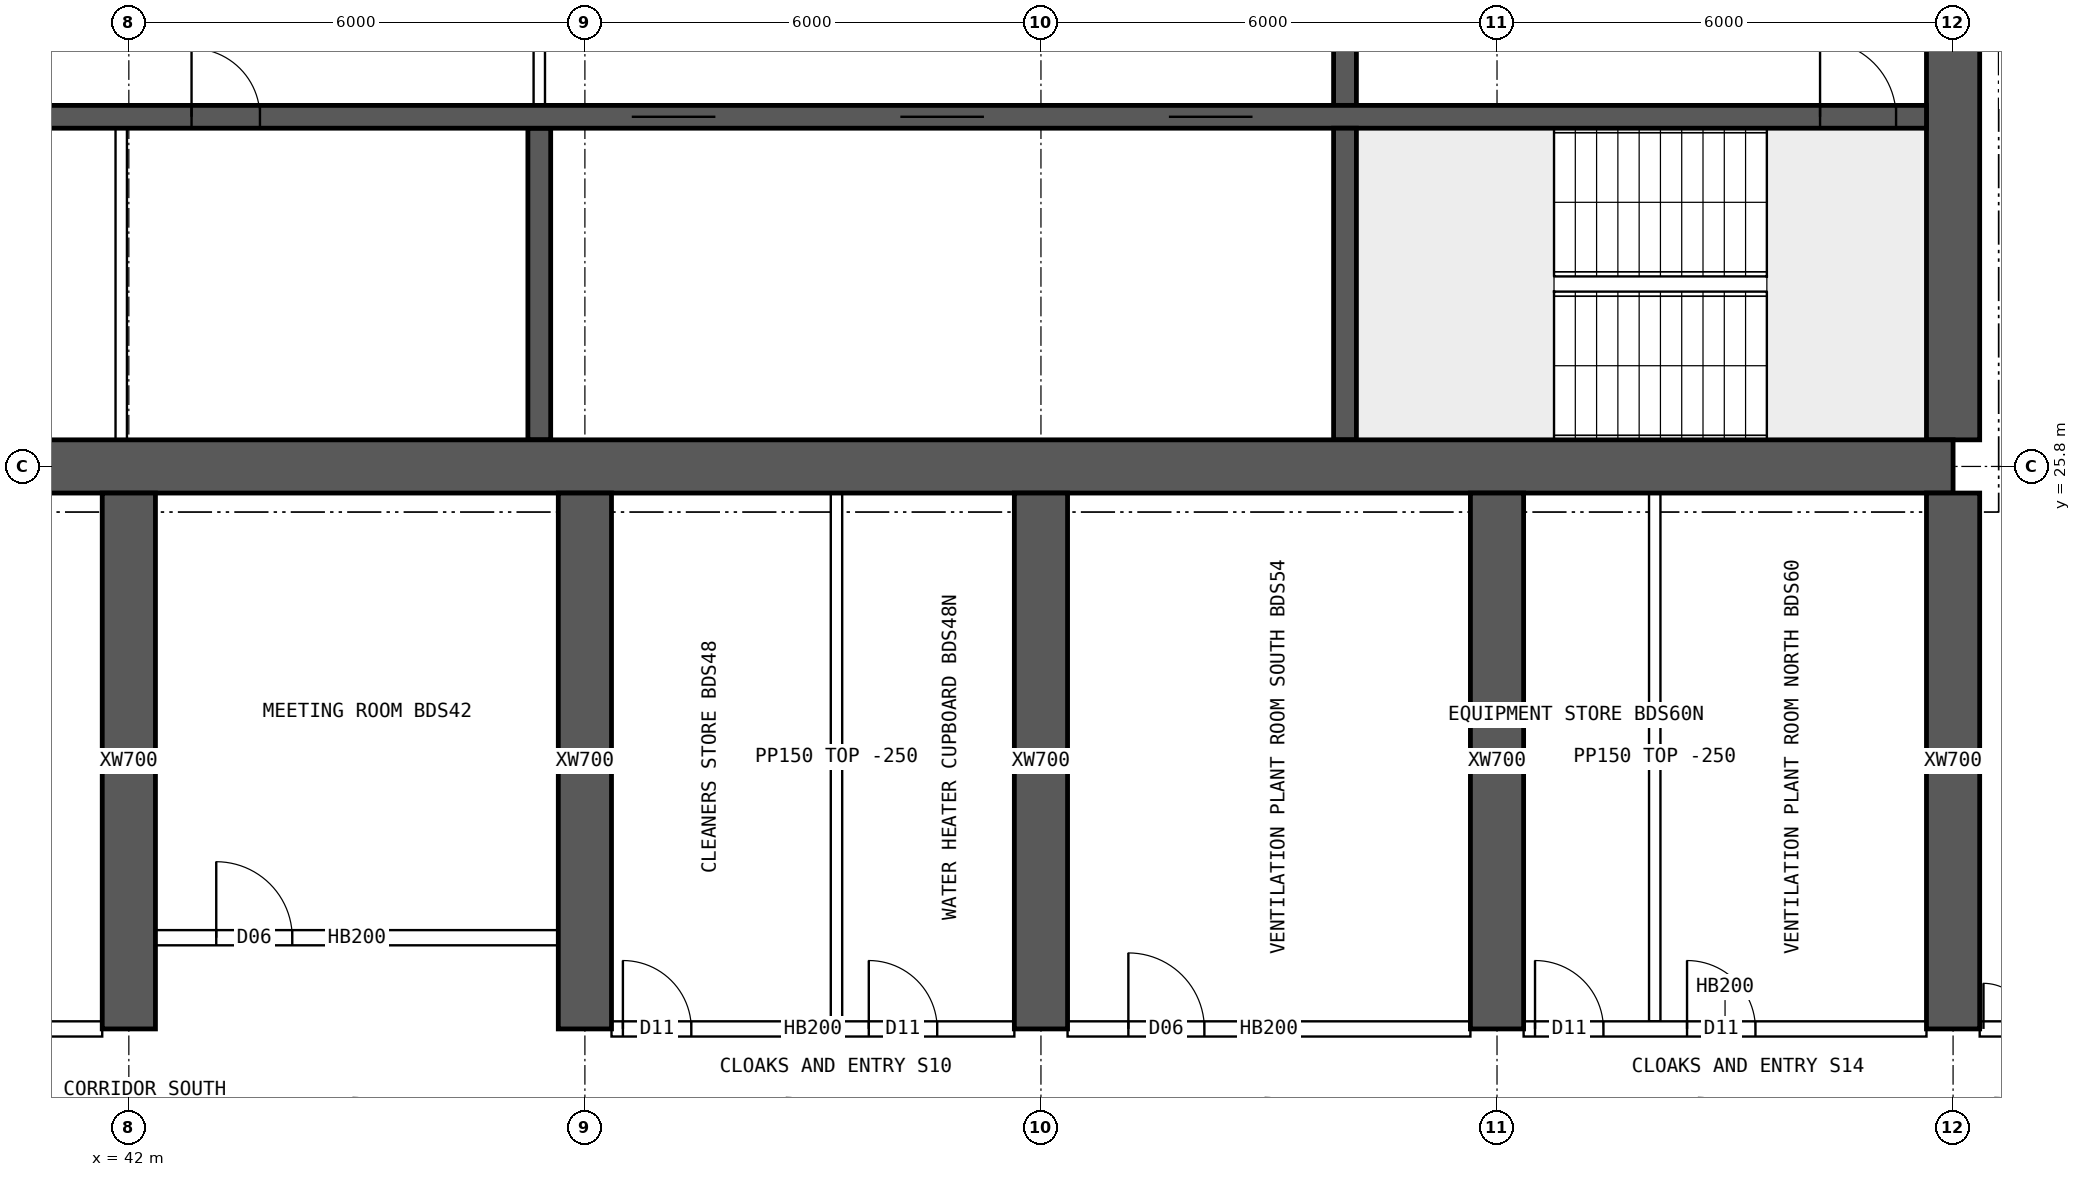
"""IFC4 building model, lengths in metres.
Left out: names, types, materials, properties, quantities, classifications, styles, units other than length and angle.
Written with IfcOpenShell. Run it as: python <this file> out.ifc"""

import sys

from ifc_helpers import new_model, si_unit, direction, frame, frame_2d, origin, place, context, subcontext, project, spatial, rectangle, extrude, element, fill, save


model = new_model("IFC4")
c1 = context("Model", 3, precision=1e-05, world=origin(), true_north=direction((0.0, 1.0)))
c2 = subcontext(c1, "Body", "Model", "MODEL_VIEW")
j1 = project(units=[si_unit("LENGTHUNIT", "METRE"), si_unit("PLANEANGLEUNIT", "RADIAN")], contexts=[c1])
p1 = place(None, origin())
s1 = spatial("IfcSite", under=j1, at=p1, CompositionType="ELEMENT")
p2 = place(p1, origin())
s2 = spatial("IfcBuilding", under=s1, at=p2, CompositionType="ELEMENT")
p3 = place(p2, frame((0.0, 0.0, 224.05)))
s3 = spatial("IfcBuildingStorey", under=s2, at=p3, CompositionType="ELEMENT", Elevation=224.05)
p4 = place(p3, frame((18.0, 25.8, 0.0), z_axis=(0.0, 0.0, 1.0), x_axis=(1.0, 0.0, 0.0)))
e1 = element("IfcWall", 1, at=p4, inside=s3, PredefinedType="SHEAR", context=c2, shape_type="SweptSolid", body=[
    extrude(rectangle(XDim=48.0, YDim=0.7, at=frame_2d((24.0, 0.0))), origin(), (0.0, 0.0, 1.0), 3.75),
])
p5 = place(p3, frame((66.0, 26.15, 0.0), z_axis=(0.0, 0.0, 1.0), x_axis=(0.0, 1.0, 0.0)))
e2 = element("IfcWall", 2, at=p5, inside=s3, PredefinedType="SHEAR", context=c2, shape_type="SweptSolid", body=[
    extrude(rectangle(XDim=11.7, YDim=0.7, at=frame_2d((5.85, 0.0))), origin(), (0.0, 0.0, 1.0), 3.75),
])
p6 = place(p5, frame((5.15, 0.0, 0.0)))
e3 = element("IfcOpeningElement", 3, at=p6, cuts=e2, PredefinedType="OPENING", context=c2, shape_type="SweptSolid", body=[
    extrude(rectangle(XDim=1.2, YDim=2.1, at=frame_2d((0.6, 1.05))), frame((0.0, 0.36, 0.0), z_axis=(0.0, -1.0, 0.0), x_axis=(1.0, 0.0, 0.0)), (0.0, 0.0, 1.0), 0.72),
])
p7 = place(p3, frame((18.35, 30.4, 0.0), z_axis=(0.0, 0.0, 1.0), x_axis=(1.0, 0.0, 0.0)))
e4 = element("IfcWall", 4, at=p7, inside=s3, PredefinedType="SHEAR", context=c2, shape_type="SweptSolid", body=[
    extrude(rectangle(XDim=47.3, YDim=0.3, at=frame_2d((23.65, 0.0))), origin(), (0.0, 0.0, 1.0), 3.75),
])
p8 = place(p7, frame((0.4, 0.0, 0.0)))
e5 = element("IfcOpeningElement", 5, at=p8, cuts=e4, PredefinedType="OPENING", context=c2, shape_type="SweptSolid", body=[
    extrude(rectangle(XDim=1.0, YDim=2.1, at=frame_2d((0.5, 1.05))), frame((0.0, 0.16, 0.0), z_axis=(0.0, -1.0, 0.0), x_axis=(1.0, 0.0, 0.0)), (0.0, 0.0, 1.0), 0.32),
])
p9 = place(p7, frame((45.9, 0.0, 0.0)))
e6 = element("IfcOpeningElement", 6, at=p9, cuts=e4, PredefinedType="OPENING", context=c2, shape_type="SweptSolid", body=[
    extrude(rectangle(XDim=1.0, YDim=2.1, at=frame_2d((0.5, 1.05))), frame((0.0, 0.16, 0.0), z_axis=(0.0, -1.0, 0.0), x_axis=(1.0, 0.0, 0.0)), (0.0, 0.0, 1.0), 0.32),
])
p10 = place(p7, frame((8.4, 0.0, 0.0)))
e7 = element("IfcOpeningElement", 7, at=p10, cuts=e4, PredefinedType="OPENING", context=c2, shape_type="SweptSolid", body=[
    extrude(rectangle(XDim=1.1, YDim=2.1, at=frame_2d((0.55, 1.05))), frame((0.0, 0.16, 0.0), z_axis=(0.0, -1.0, 0.0), x_axis=(1.0, 0.0, 0.0)), (0.0, 0.0, 1.0), 0.32),
])
p11 = place(p7, frame((11.0, 0.0, 0.0)))
e8 = element("IfcOpeningElement", 8, at=p11, cuts=e4, PredefinedType="OPENING", context=c2, shape_type="SweptSolid", body=[
    extrude(rectangle(XDim=1.1, YDim=2.1, at=frame_2d((0.55, 1.05))), frame((0.0, 0.16, 0.0), z_axis=(0.0, -1.0, 0.0), x_axis=(1.0, 0.0, 0.0)), (0.0, 0.0, 1.0), 0.32),
])
p12 = place(p7, frame((13.6, 0.0, 0.0)))
e9 = element("IfcOpeningElement", 9, at=p12, cuts=e4, PredefinedType="OPENING", context=c2, shape_type="SweptSolid", body=[
    extrude(rectangle(XDim=1.1, YDim=2.1, at=frame_2d((0.55, 1.05))), frame((0.0, 0.16, 0.0), z_axis=(0.0, -1.0, 0.0), x_axis=(1.0, 0.0, 0.0)), (0.0, 0.0, 1.0), 0.32),
])
p13 = place(p7, frame((16.2, 0.0, 0.0)))
e10 = element("IfcOpeningElement", 10, at=p13, cuts=e4, PredefinedType="OPENING", context=c2, shape_type="SweptSolid", body=[
    extrude(rectangle(XDim=1.1, YDim=2.1, at=frame_2d((0.55, 1.05))), frame((0.0, 0.16, 0.0), z_axis=(0.0, -1.0, 0.0), x_axis=(1.0, 0.0, 0.0)), (0.0, 0.0, 1.0), 0.32),
])
p14 = place(p7, frame((18.975, 0.0, 0.0)))
e11 = element("IfcOpeningElement", 11, at=p14, cuts=e4, PredefinedType="OPENING", context=c2, shape_type="SweptSolid", body=[
    extrude(rectangle(XDim=0.9, YDim=2.1, at=frame_2d((0.45, 1.05))), frame((0.0, 0.16, 0.0), z_axis=(0.0, -1.0, 0.0), x_axis=(1.0, 0.0, 0.0)), (0.0, 0.0, 1.0), 0.32),
])
p15 = place(p7, frame((24.475, 0.0, 0.0)))
e12 = element("IfcOpeningElement", 12, at=p15, cuts=e4, PredefinedType="OPENING", context=c2, shape_type="SweptSolid", body=[
    extrude(rectangle(XDim=0.9, YDim=2.1, at=frame_2d((0.45, 1.05))), frame((0.0, 0.16, 0.0), z_axis=(0.0, -1.0, 0.0), x_axis=(1.0, 0.0, 0.0)), (0.0, 0.0, 1.0), 0.32),
])
p16 = place(p7, frame((30.267, 0.0, 0.0)))
e13 = element("IfcOpeningElement", 13, at=p16, cuts=e4, PredefinedType="OPENING", context=c2, shape_type="SweptSolid", body=[
    extrude(rectangle(XDim=1.1, YDim=2.1, at=frame_2d((0.55, 1.05))), frame((0.0, 0.16, 0.0), z_axis=(0.0, -1.0, 0.0), x_axis=(1.0, 0.0, 0.0)), (0.0, 0.0, 1.0), 0.32),
])
p17 = place(p7, frame((33.8, 0.0, 0.0)))
e14 = element("IfcOpeningElement", 14, at=p17, cuts=e4, PredefinedType="OPENING", context=c2, shape_type="SweptSolid", body=[
    extrude(rectangle(XDim=1.1, YDim=2.1, at=frame_2d((0.55, 1.05))), frame((0.0, 0.16, 0.0), z_axis=(0.0, -1.0, 0.0), x_axis=(1.0, 0.0, 0.0)), (0.0, 0.0, 1.0), 0.32),
])
p18 = place(p7, frame((37.333, 0.0, 0.0)))
e15 = element("IfcOpeningElement", 15, at=p18, cuts=e4, PredefinedType="OPENING", context=c2, shape_type="SweptSolid", body=[
    extrude(rectangle(XDim=1.1, YDim=2.1, at=frame_2d((0.55, 1.05))), frame((0.0, 0.16, 0.0), z_axis=(0.0, -1.0, 0.0), x_axis=(1.0, 0.0, 0.0)), (0.0, 0.0, 1.0), 0.32),
])
p19 = place(p3, frame((58.0, 26.15, 0.0), z_axis=(0.0, 0.0, 1.0), x_axis=(0.0, 1.0, 0.0)))
e16 = element("IfcWall", 16, at=p19, inside=s3, PredefinedType="SHEAR", context=c2, shape_type="SweptSolid", body=[
    extrude(rectangle(XDim=4.1, YDim=0.3, at=frame_2d((2.05, 0.0))), origin(), (0.0, 0.0, 1.0), 3.75),
])
p20 = place(p3, frame((58.0, 30.55, 0.0), z_axis=(0.0, 0.0, 1.0), x_axis=(0.0, 1.0, 0.0)))
e17 = element("IfcWall", 17, at=p20, inside=s3, PredefinedType="SHEAR", context=c2, shape_type="SweptSolid", body=[
    extrude(rectangle(XDim=3.9, YDim=0.3, at=frame_2d((1.95, 0.0))), origin(), (0.0, 0.0, 1.0), 3.75),
])
p21 = place(p20, frame((1.4, 0.0, 0.0)))
e18 = element("IfcOpeningElement", 18, at=p21, cuts=e17, PredefinedType="OPENING", context=c2, shape_type="SweptSolid", body=[
    extrude(rectangle(XDim=1.2, YDim=2.1, at=frame_2d((0.6, 1.05))), frame((0.0, 0.16, 0.0), z_axis=(0.0, -1.0, 0.0), x_axis=(1.0, 0.0, 0.0)), (0.0, 0.0, 1.0), 0.32),
])
p22 = place(p3, frame((47.4, 26.15, 0.0), z_axis=(0.0, 0.0, 1.0), x_axis=(0.0, 1.0, 0.0)))
e19 = element("IfcWall", 19, at=p22, inside=s3, PredefinedType="SHEAR", context=c2, shape_type="SweptSolid", body=[
    extrude(rectangle(XDim=4.1, YDim=0.3, at=frame_2d((2.05, 0.0))), origin(), (0.0, 0.0, 1.0), 3.75),
])
for number, where, z_axis, x_axis in (
    (20, (42.0, 18.4, 0.0), (0.0, 0.0, 1.0), (0.0, 1.0, 0.0)),
    (21, (48.0, 18.4, 0.0), (0.0, 0.0, 1.0), (0.0, 1.0, 0.0)),
    (22, (54.0, 18.4, 0.0), (0.0, 0.0, 1.0), (0.0, 1.0, 0.0)),
    (23, (60.0, 18.4, 0.0), (0.0, 0.0, 1.0), (0.0, 1.0, 0.0)),
    (24, (66.0, 18.4, 0.0), (0.0, 0.0, 1.0), (0.0, 1.0, 0.0)),
):
    element("IfcWall", number, at=place(p3, frame(where, z_axis=z_axis, x_axis=x_axis)), inside=s3, PredefinedType="SHEAR", context=c2, shape_type="SweptSolid", body=[
        extrude(rectangle(XDim=7.05, YDim=0.7, at=frame_2d((3.525, 0.0))), origin(), (0.0, 0.0, 1.0), 3.75),
    ])
p23 = place(p3, frame((47.4, 30.55, 0.0), z_axis=(0.0, 0.0, 1.0), x_axis=(0.0, 1.0, 0.0)))
e25 = element("IfcWall", 25, at=p23, inside=s3, PredefinedType="SOLIDWALL", context=c2, shape_type="SweptSolid", body=[
    extrude(rectangle(XDim=3.9, YDim=0.15, at=frame_2d((1.95, 0.0))), origin(), (0.0, 0.0, 1.0), 3.5),
])
p24 = place(p23, frame((1.15, 0.0, 0.0)))
e26 = element("IfcOpeningElement", 26, at=p24, cuts=e25, PredefinedType="OPENING", context=c2, shape_type="SweptSolid", body=[
    extrude(rectangle(XDim=1.6, YDim=2.1, at=frame_2d((0.8, 1.05))), frame((0.0, 0.085, 0.0), z_axis=(0.0, -1.0, 0.0), x_axis=(1.0, 0.0, 0.0)), (0.0, 0.0, 1.0), 0.17),
])
p25 = place(p3, frame((41.9, 26.15, 0.0), z_axis=(0.0, 0.0, 1.0), x_axis=(0.0, 1.0, 0.0)))
e27 = element("IfcWall", 27, at=p25, inside=s3, PredefinedType="SOLIDWALL", context=c2, shape_type="SweptSolid", body=[
    extrude(rectangle(XDim=4.1, YDim=0.15, at=frame_2d((2.05, 0.0))), origin(), (0.0, 0.0, 1.0), 3.5),
])
p26 = place(p3, frame((36.35, 18.4, 0.0), z_axis=(0.0, 0.0, 1.0), x_axis=(1.0, 0.0, 0.0)))
e28 = element("IfcWall", 28, at=p26, inside=s3, PredefinedType="SOLIDWALL", context=c2, shape_type="SweptSolid", body=[
    extrude(rectangle(XDim=5.3, YDim=0.2, at=frame_2d((2.65, 0.0))), origin(), (0.0, 0.0, 1.0), 3.5),
])
p27 = place(p26, frame((0.525, 0.0, 0.0)))
e29 = element("IfcOpeningElement", 29, at=p27, cuts=e28, PredefinedType="OPENING", context=c2, shape_type="SweptSolid", body=[
    extrude(rectangle(XDim=1.0, YDim=2.1, at=frame_2d((0.5, 1.05))), frame((0.0, 0.11, 0.0), z_axis=(0.0, -1.0, 0.0), x_axis=(1.0, 0.0, 0.0)), (0.0, 0.0, 1.0), 0.22),
])
p28 = place(p3, frame((48.35, 18.4, 0.0), z_axis=(0.0, 0.0, 1.0), x_axis=(1.0, 0.0, 0.0)))
e30 = element("IfcWall", 30, at=p28, inside=s3, PredefinedType="SOLIDWALL", context=c2, shape_type="SweptSolid", body=[
    extrude(rectangle(XDim=5.3, YDim=0.2, at=frame_2d((2.65, 0.0))), origin(), (0.0, 0.0, 1.0), 3.5),
])
p29 = place(p28, frame((0.15, 0.0, 0.0)))
e31 = element("IfcOpeningElement", 31, at=p29, cuts=e30, PredefinedType="OPENING", context=c2, shape_type="SweptSolid", body=[
    extrude(rectangle(XDim=0.9, YDim=2.1, at=frame_2d((0.45, 1.05))), frame((0.0, 0.11, 0.0), z_axis=(0.0, -1.0, 0.0), x_axis=(1.0, 0.0, 0.0)), (0.0, 0.0, 1.0), 0.22),
])
p30 = place(p28, frame((3.385, 0.0, 0.0)))
e32 = element("IfcOpeningElement", 32, at=p30, cuts=e30, PredefinedType="OPENING", context=c2, shape_type="SweptSolid", body=[
    extrude(rectangle(XDim=0.9, YDim=2.1, at=frame_2d((0.45, 1.05))), frame((0.0, 0.11, 0.0), z_axis=(0.0, -1.0, 0.0), x_axis=(1.0, 0.0, 0.0)), (0.0, 0.0, 1.0), 0.22),
])
p31 = place(p3, frame((54.35, 18.4, 0.0), z_axis=(0.0, 0.0, 1.0), x_axis=(1.0, 0.0, 0.0)))
e33 = element("IfcWall", 33, at=p31, inside=s3, PredefinedType="SOLIDWALL", context=c2, shape_type="SweptSolid", body=[
    extrude(rectangle(XDim=5.3, YDim=0.2, at=frame_2d((2.65, 0.0))), origin(), (0.0, 0.0, 1.0), 3.5),
])
p32 = place(p31, frame((0.8, 0.0, 0.0)))
e34 = element("IfcOpeningElement", 34, at=p32, cuts=e33, PredefinedType="OPENING", context=c2, shape_type="SweptSolid", body=[
    extrude(rectangle(XDim=1.0, YDim=2.1, at=frame_2d((0.5, 1.05))), frame((0.0, 0.11, 0.0), z_axis=(0.0, -1.0, 0.0), x_axis=(1.0, 0.0, 0.0)), (0.0, 0.0, 1.0), 0.22),
])
p33 = place(p3, frame((60.35, 18.4, 0.0), z_axis=(0.0, 0.0, 1.0), x_axis=(1.0, 0.0, 0.0)))
e35 = element("IfcWall", 35, at=p33, inside=s3, PredefinedType="SOLIDWALL", context=c2, shape_type="SweptSolid", body=[
    extrude(rectangle(XDim=5.3, YDim=0.2, at=frame_2d((2.65, 0.0))), origin(), (0.0, 0.0, 1.0), 3.5),
])
p34 = place(p33, frame((0.15, 0.0, 0.0)))
e36 = element("IfcOpeningElement", 36, at=p34, cuts=e35, PredefinedType="OPENING", context=c2, shape_type="SweptSolid", body=[
    extrude(rectangle(XDim=0.9, YDim=2.1, at=frame_2d((0.45, 1.05))), frame((0.0, 0.11, 0.0), z_axis=(0.0, -1.0, 0.0), x_axis=(1.0, 0.0, 0.0)), (0.0, 0.0, 1.0), 0.22),
])
p35 = place(p33, frame((2.15, 0.0, 0.0)))
e37 = element("IfcOpeningElement", 37, at=p35, cuts=e35, PredefinedType="OPENING", context=c2, shape_type="SweptSolid", body=[
    extrude(rectangle(XDim=0.9, YDim=2.1, at=frame_2d((0.45, 1.05))), frame((0.0, 0.11, 0.0), z_axis=(0.0, -1.0, 0.0), x_axis=(1.0, 0.0, 0.0)), (0.0, 0.0, 1.0), 0.22),
])
p36 = place(p3, frame((66.35, 18.4, 0.0), z_axis=(0.0, 0.0, 1.0), x_axis=(1.0, 0.0, 0.0)))
e38 = element("IfcWall", 38, at=p36, inside=s3, PredefinedType="SOLIDWALL", context=c2, shape_type="SweptSolid", body=[
    extrude(rectangle(XDim=2.05, YDim=0.2, at=frame_2d((1.025, 0.0))), origin(), (0.0, 0.0, 1.0), 3.5),
])
p37 = place(p36, frame((0.05, 0.0, 0.0)))
e39 = element("IfcOpeningElement", 39, at=p37, cuts=e38, PredefinedType="OPENING", context=c2, shape_type="SweptSolid", body=[
    extrude(rectangle(XDim=1.2, YDim=2.1, at=frame_2d((0.6, 1.05))), frame((0.0, 0.11, 0.0), z_axis=(0.0, -1.0, 0.0), x_axis=(1.0, 0.0, 0.0)), (0.0, 0.0, 1.0), 0.22),
])
p38 = place(p3, frame((42.35, 19.6, 0.0), z_axis=(0.0, 0.0, 1.0), x_axis=(1.0, 0.0, 0.0)))
e40 = element("IfcWall", 40, at=p38, inside=s3, PredefinedType="SOLIDWALL", context=c2, shape_type="SweptSolid", body=[
    extrude(rectangle(XDim=5.3, YDim=0.2, at=frame_2d((2.65, 0.0))), origin(), (0.0, 0.0, 1.0), 3.5),
])
p39 = place(p38, frame((0.8, 0.0, 0.0)))
e41 = element("IfcOpeningElement", 41, at=p39, cuts=e40, PredefinedType="OPENING", context=c2, shape_type="SweptSolid", body=[
    extrude(rectangle(XDim=1.0, YDim=2.1, at=frame_2d((0.5, 1.05))), frame((0.0, 0.11, 0.0), z_axis=(0.0, -1.0, 0.0), x_axis=(1.0, 0.0, 0.0)), (0.0, 0.0, 1.0), 0.22),
])
for number, where, z_axis, x_axis in (
    (42, (51.31, 18.5, 0.0), (0.0, 0.0, 1.0), (0.0, 1.0, 0.0)),
    (43, (62.075, 18.5, 0.0), (0.0, 0.0, 1.0), (0.0, 1.0, 0.0)),
):
    element("IfcWall", number, at=place(p3, frame(where, z_axis=z_axis, x_axis=x_axis)), inside=s3, PredefinedType="PARTITIONING", context=c2, shape_type="SweptSolid", body=[
        extrude(rectangle(XDim=6.95, YDim=0.15, at=frame_2d((3.475, 0.0))), origin(), (0.0, 0.0, 1.0), 3.5),
    ])
p40 = place(p9, origin())
e44 = element("IfcDoor", 44, at=p40, inside=s3, OperationType="SINGLE_SWING_LEFT", PredefinedType="DOOR", context=c2, shape_type="SweptSolid", body=[
    extrude(rectangle(XDim=1.0, YDim=2.1, at=frame_2d((0.5, 1.05))), frame((0.0, 0.025, 0.0), z_axis=(0.0, -1.0, 0.0), x_axis=(1.0, 0.0, 0.0)), (0.0, 0.0, 1.0), 0.05),
])
fill(e6, e44)
p41 = place(p15, origin())
e45 = element("IfcDoor", 45, at=p41, inside=s3, OperationType="SINGLE_SWING_LEFT", PredefinedType="DOOR", context=c2, shape_type="SweptSolid", body=[
    extrude(rectangle(XDim=0.9, YDim=2.1, at=frame_2d((0.45, 1.05))), frame((0.0, 0.025, 0.0), z_axis=(0.0, -1.0, 0.0), x_axis=(1.0, 0.0, 0.0)), (0.0, 0.0, 1.0), 0.05),
])
fill(e12, e45)
p42 = place(p16, origin())
e46 = element("IfcDoor", 46, at=p42, inside=s3, OperationType="DOUBLE_DOOR_SLIDING", PredefinedType="DOOR", context=c2, shape_type="SweptSolid", body=[
    extrude(rectangle(XDim=1.1, YDim=2.1, at=frame_2d((0.55, 1.05))), frame((0.0, 0.025, 0.0), z_axis=(0.0, -1.0, 0.0), x_axis=(1.0, 0.0, 0.0)), (0.0, 0.0, 1.0), 0.05),
])
fill(e13, e46)
p43 = place(p17, origin())
e47 = element("IfcDoor", 47, at=p43, inside=s3, OperationType="DOUBLE_DOOR_SLIDING", PredefinedType="DOOR", context=c2, shape_type="SweptSolid", body=[
    extrude(rectangle(XDim=1.1, YDim=2.1, at=frame_2d((0.55, 1.05))), frame((0.0, 0.025, 0.0), z_axis=(0.0, -1.0, 0.0), x_axis=(1.0, 0.0, 0.0)), (0.0, 0.0, 1.0), 0.05),
])
fill(e14, e47)
p44 = place(p18, origin())
e48 = element("IfcDoor", 48, at=p44, inside=s3, OperationType="DOUBLE_DOOR_SLIDING", PredefinedType="DOOR", context=c2, shape_type="SweptSolid", body=[
    extrude(rectangle(XDim=1.1, YDim=2.1, at=frame_2d((0.55, 1.05))), frame((0.0, 0.025, 0.0), z_axis=(0.0, -1.0, 0.0), x_axis=(1.0, 0.0, 0.0)), (0.0, 0.0, 1.0), 0.05),
])
fill(e15, e48)
p45 = place(p37, origin())
e49 = element("IfcDoor", 49, at=p45, inside=s3, OperationType="DOUBLE_DOOR_SINGLE_SWING", PredefinedType="DOOR", context=c2, shape_type="SweptSolid", body=[
    extrude(rectangle(XDim=1.2, YDim=2.1, at=frame_2d((0.6, 1.05))), frame((0.0, 0.025, 0.0), z_axis=(0.0, -1.0, 0.0), x_axis=(1.0, 0.0, 0.0)), (0.0, 0.0, 1.0), 0.05),
])
fill(e39, e49)
p46 = place(p39, origin())
e50 = element("IfcDoor", 50, at=p46, inside=s3, OperationType="SINGLE_SWING_LEFT", PredefinedType="DOOR", context=c2, shape_type="SweptSolid", body=[
    extrude(rectangle(XDim=1.0, YDim=2.1, at=frame_2d((0.5, 1.05))), frame((0.0, 0.025, 0.0), z_axis=(0.0, -1.0, 0.0), x_axis=(1.0, 0.0, 0.0)), (0.0, 0.0, 1.0), 0.05),
])
fill(e41, e50)
p47 = place(p29, origin())
e51 = element("IfcDoor", 51, at=p47, inside=s3, OperationType="SINGLE_SWING_LEFT", PredefinedType="DOOR", context=c2, shape_type="SweptSolid", body=[
    extrude(rectangle(XDim=0.9, YDim=2.1, at=frame_2d((0.45, 1.05))), frame((0.0, 0.025, 0.0), z_axis=(0.0, -1.0, 0.0), x_axis=(1.0, 0.0, 0.0)), (0.0, 0.0, 1.0), 0.05),
])
fill(e31, e51)
p48 = place(p30, origin())
e52 = element("IfcDoor", 52, at=p48, inside=s3, OperationType="SINGLE_SWING_LEFT", PredefinedType="DOOR", context=c2, shape_type="SweptSolid", body=[
    extrude(rectangle(XDim=0.9, YDim=2.1, at=frame_2d((0.45, 1.05))), frame((0.0, 0.025, 0.0), z_axis=(0.0, -1.0, 0.0), x_axis=(1.0, 0.0, 0.0)), (0.0, 0.0, 1.0), 0.05),
])
fill(e32, e52)
p49 = place(p32, origin())
e53 = element("IfcDoor", 53, at=p49, inside=s3, OperationType="SINGLE_SWING_LEFT", PredefinedType="DOOR", context=c2, shape_type="SweptSolid", body=[
    extrude(rectangle(XDim=1.0, YDim=2.1, at=frame_2d((0.5, 1.05))), frame((0.0, 0.025, 0.0), z_axis=(0.0, -1.0, 0.0), x_axis=(1.0, 0.0, 0.0)), (0.0, 0.0, 1.0), 0.05),
])
fill(e34, e53)
p50 = place(p34, origin())
e54 = element("IfcDoor", 54, at=p50, inside=s3, OperationType="SINGLE_SWING_LEFT", PredefinedType="DOOR", context=c2, shape_type="SweptSolid", body=[
    extrude(rectangle(XDim=0.9, YDim=2.1, at=frame_2d((0.45, 1.05))), frame((0.0, 0.025, 0.0), z_axis=(0.0, -1.0, 0.0), x_axis=(1.0, 0.0, 0.0)), (0.0, 0.0, 1.0), 0.05),
])
fill(e36, e54)
p51 = place(p35, origin())
e55 = element("IfcDoor", 55, at=p51, inside=s3, OperationType="SINGLE_SWING_LEFT", PredefinedType="DOOR", context=c2, shape_type="SweptSolid", body=[
    extrude(rectangle(XDim=0.9, YDim=2.1, at=frame_2d((0.45, 1.05))), frame((0.0, 0.025, 0.0), z_axis=(0.0, -1.0, 0.0), x_axis=(1.0, 0.0, 0.0)), (0.0, 0.0, 1.0), 0.05),
])
fill(e37, e55)
save(model, sys.argv[1])
